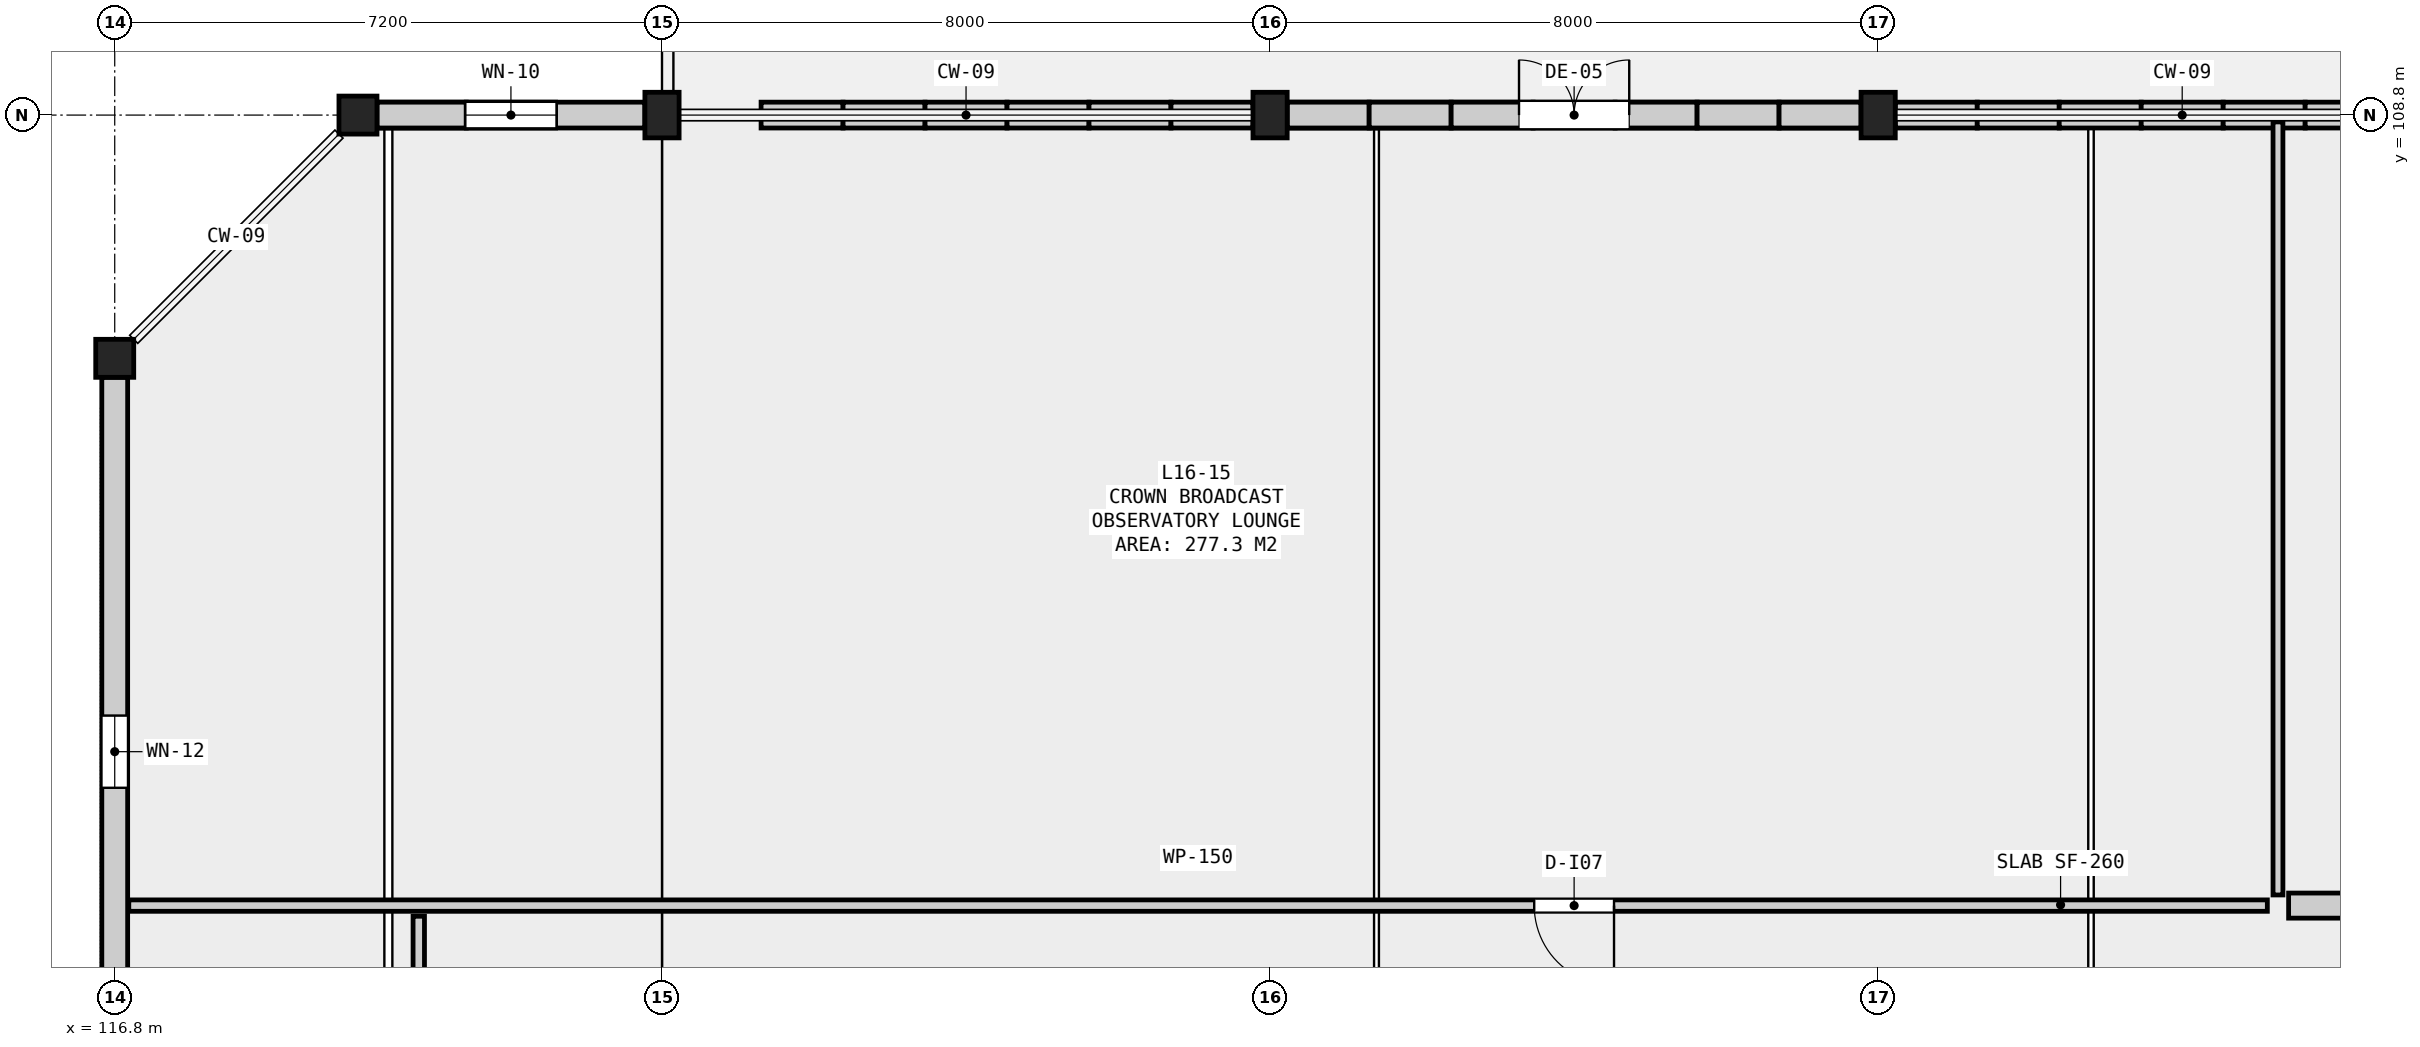
"""IFC4 building model, lengths in metres.
Left out: names, types, materials, properties, quantities, classifications, styles, units other than length and angle.
Written with IfcOpenShell. Run it as: python <this file> out.ifc"""

import sys

from ifc_helpers import new_model, si_unit, direction, frame, frame_2d, origin, origin_2d, place, context, subcontext, project, spatial, rectangle, circle, extrude, element, fill, save


model = new_model("IFC4")
c1 = context("Model", 3, precision=1e-05, world=origin(), true_north=direction((0.0, 1.0)))
c2 = subcontext(c1, "Body", "Model", "MODEL_VIEW")
j1 = project(units=[si_unit("LENGTHUNIT", "METRE"), si_unit("PLANEANGLEUNIT", "RADIAN")], contexts=[c1])
p1 = place(None, origin())
s1 = spatial("IfcSite", under=j1, at=p1, CompositionType="ELEMENT")
p2 = place(p1, origin())
s2 = spatial("IfcBuilding", under=s1, at=p2, CompositionType="ELEMENT")
p3 = place(p2, frame((0.0, 0.0, 66.6)))
s3 = spatial("IfcBuildingStorey", under=s2, at=p3, CompositionType="ELEMENT", Elevation=66.6)
for number, where, z_axis, x_axis in (
    (1, (116.8, 105.6, 0.0), (0.0, 0.0, 1.0), (1.0, 0.0, 0.0)),
    (2, (120.0, 108.8, 0.0), (0.0, 0.0, 1.0), (1.0, 0.0, 0.0)),
):
    element("IfcColumn", number, at=place(p3, frame(where, z_axis=z_axis, x_axis=x_axis)), inside=s3, PredefinedType="COLUMN", context=c2, shape_type="SweptSolid", body=[
        extrude(circle(Radius=0.25, at=origin_2d()), origin(), (0.0, 0.0, 1.0), 4.5),
    ])
for number, where, z_axis, x_axis in (
    (3, (124.0, 108.8, 0.0), (0.0, 0.0, 1.0), (1.0, 0.0, 0.0)),
    (4, (132.0, 108.8, 0.0), (0.0, 0.0, 1.0), (1.0, 0.0, 0.0)),
    (5, (140.0, 108.8, 0.0), (0.0, 0.0, 1.0), (1.0, 0.0, 0.0)),
):
    element("IfcColumn", number, at=place(p3, frame(where, z_axis=z_axis, x_axis=x_axis)), inside=s3, PredefinedType="COLUMN", context=c2, shape_type="SweptSolid", body=[
        extrude(rectangle(XDim=0.45, YDim=0.6, at=origin_2d()), origin(), (0.0, 0.0, 1.0), 4.5),
    ])
p4 = place(p3, frame((139.775, 108.8, 0.0), z_axis=(0.0, 0.0, 1.0), x_axis=(-1.0, 0.0, 0.0)))
e6 = element("IfcWall", 6, at=p4, inside=s3, PredefinedType="SOLIDWALL", context=c2, shape_type="SweptSolid", body=[
    extrude(rectangle(XDim=7.55, YDim=0.34, at=frame_2d((3.775, 0.0))), origin(), (0.0, 0.0, 1.0), 3.6),
])
p5 = place(p4, frame((3.05, 0.0, 0.0)))
e7 = element("IfcOpeningElement", 7, at=p5, cuts=e6, PredefinedType="OPENING", context=c2, shape_type="SweptSolid", body=[
    extrude(rectangle(XDim=1.45, YDim=2.2, at=frame_2d((0.725, 1.1))), frame((0.0, 0.182, 0.0), z_axis=(0.0, -1.0, 0.0), x_axis=(1.0, 0.0, 0.0)), (0.0, 0.0, 1.0), 0.364),
])
p6 = place(p3, frame((123.775, 108.8, 0.0), z_axis=(0.0, 0.0, 1.0), x_axis=(-1.0, 0.0, 0.0)))
e8 = element("IfcWall", 8, at=p6, inside=s3, PredefinedType="SOLIDWALL", context=c2, shape_type="SweptSolid", body=[
    extrude(rectangle(XDim=3.525, YDim=0.34, at=frame_2d((1.762, 0.0))), origin(), (0.0, 0.0, 1.0), 3.65),
])
p7 = place(p6, frame((1.163, 0.0, 0.9)))
e9 = element("IfcOpeningElement", 9, at=p7, cuts=e8, PredefinedType="OPENING", context=c2, shape_type="SweptSolid", body=[
    extrude(rectangle(XDim=1.2, YDim=1.7, at=frame_2d((0.6, 0.85))), frame((0.0, 0.182, 0.0), z_axis=(0.0, -1.0, 0.0), x_axis=(1.0, 0.0, 0.0)), (0.0, 0.0, 1.0), 0.364),
])
p8 = place(p3, frame((116.8, 105.35, 0.0), z_axis=(0.0, 0.0, 1.0), x_axis=(0.0, -1.0, 0.0)))
e10 = element("IfcWall", 10, at=p8, inside=s3, PredefinedType="SOLIDWALL", context=c2, shape_type="SweptSolid", body=[
    extrude(rectangle(XDim=9.85, YDim=0.34, at=frame_2d((4.925, 0.0))), origin(), (0.0, 0.0, 1.0), 3.65),
])
p9 = place(p8, frame((4.45, 0.0, 0.9)))
e11 = element("IfcOpeningElement", 11, at=p9, cuts=e10, PredefinedType="OPENING", context=c2, shape_type="SweptSolid", body=[
    extrude(rectangle(XDim=0.95, YDim=1.45, at=frame_2d((0.475, 0.725))), frame((0.0, 0.182, 0.0), z_axis=(0.0, -1.0, 0.0), x_axis=(1.0, 0.0, 0.0)), (0.0, 0.0, 1.0), 0.364),
])
p10 = place(p3, frame((125.304, 108.8, 4.5), z_axis=(0.0, 0.0, 1.0), x_axis=(1.0, 0.0, 0.0)))
e12 = element("IfcWall", 12, at=p10, inside=s3, PredefinedType="SOLIDWALL", context=c2, shape_type="SweptSolid", body=[
    extrude(rectangle(XDim=1.078, YDim=0.34, at=frame_2d((0.539, 0.0))), origin(), (0.0, 0.0, 1.0), 0.272),
])
p11 = place(p3, frame((126.382, 108.8, 4.5), z_axis=(0.0, 0.0, 1.0), x_axis=(1.0, 0.0, 0.0)))
e13 = element("IfcWall", 13, at=p11, inside=s3, PredefinedType="SOLIDWALL", context=c2, shape_type="SweptSolid", body=[
    extrude(rectangle(XDim=1.079, YDim=0.34, at=frame_2d((0.539, 0.0))), origin(), (0.0, 0.0, 1.0), 0.498),
])
p12 = place(p3, frame((127.461, 108.8, 4.5), z_axis=(0.0, 0.0, 1.0), x_axis=(1.0, 0.0, 0.0)))
e14 = element("IfcWall", 14, at=p12, inside=s3, PredefinedType="SOLIDWALL", context=c2, shape_type="SweptSolid", body=[
    extrude(rectangle(XDim=1.079, YDim=0.34, at=frame_2d((0.539, 0.0))), origin(), (0.0, 0.0, 1.0), 0.723),
])
p13 = place(p3, frame((128.539, 108.8, 4.5), z_axis=(0.0, 0.0, 1.0), x_axis=(1.0, 0.0, 0.0)))
e15 = element("IfcWall", 15, at=p13, inside=s3, PredefinedType="SOLIDWALL", context=c2, shape_type="SweptSolid", body=[
    extrude(rectangle(XDim=1.079, YDim=0.34, at=frame_2d((0.539, 0.0))), origin(), (0.0, 0.0, 1.0), 0.948),
])
p14 = place(p3, frame((129.618, 108.8, 4.5), z_axis=(0.0, 0.0, 1.0), x_axis=(1.0, 0.0, 0.0)))
e16 = element("IfcWall", 16, at=p14, inside=s3, PredefinedType="SOLIDWALL", context=c2, shape_type="SweptSolid", body=[
    extrude(rectangle(XDim=1.078, YDim=0.34, at=frame_2d((0.539, 0.0))), origin(), (0.0, 0.0, 1.0), 1.174),
])
p15 = place(p3, frame((130.696, 108.8, 4.5), z_axis=(0.0, 0.0, 1.0), x_axis=(1.0, 0.0, 0.0)))
e17 = element("IfcWall", 17, at=p15, inside=s3, PredefinedType="SOLIDWALL", context=c2, shape_type="SweptSolid", body=[
    extrude(rectangle(XDim=1.079, YDim=0.34, at=frame_2d((0.539, 0.0))), origin(), (0.0, 0.0, 1.0), 1.399),
])
p16 = place(p3, frame((132.225, 108.8, 4.5), z_axis=(0.0, 0.0, 1.0), x_axis=(1.0, 0.0, 0.0)))
e18 = element("IfcWall", 18, at=p16, inside=s3, PredefinedType="SOLIDWALL", context=c2, shape_type="SweptSolid", body=[
    extrude(rectangle(XDim=1.079, YDim=0.34, at=frame_2d((0.539, 0.0))), origin(), (0.0, 0.0, 1.0), 1.718),
])
p17 = place(p3, frame((133.304, 108.8, 4.5), z_axis=(0.0, 0.0, 1.0), x_axis=(1.0, 0.0, 0.0)))
e19 = element("IfcWall", 19, at=p17, inside=s3, PredefinedType="SOLIDWALL", context=c2, shape_type="SweptSolid", body=[
    extrude(rectangle(XDim=1.078, YDim=0.34, at=frame_2d((0.539, 0.0))), origin(), (0.0, 0.0, 1.0), 1.944),
])
p18 = place(p3, frame((134.382, 108.8, 4.5), z_axis=(0.0, 0.0, 1.0), x_axis=(1.0, 0.0, 0.0)))
e20 = element("IfcWall", 20, at=p18, inside=s3, PredefinedType="SOLIDWALL", context=c2, shape_type="SweptSolid", body=[
    extrude(rectangle(XDim=1.079, YDim=0.34, at=frame_2d((0.539, 0.0))), origin(), (0.0, 0.0, 1.0), 2.14),
])
p19 = place(p3, frame((135.461, 108.8, 4.5), z_axis=(0.0, 0.0, 1.0), x_axis=(1.0, 0.0, 0.0)))
e21 = element("IfcWall", 21, at=p19, inside=s3, PredefinedType="SOLIDWALL", context=c2, shape_type="SweptSolid", body=[
    extrude(rectangle(XDim=1.079, YDim=0.34, at=frame_2d((0.539, 0.0))), origin(), (0.0, 0.0, 1.0), 2.334),
])
p20 = place(p3, frame((136.539, 108.8, 4.5), z_axis=(0.0, 0.0, 1.0), x_axis=(1.0, 0.0, 0.0)))
e22 = element("IfcWall", 22, at=p20, inside=s3, PredefinedType="SOLIDWALL", context=c2, shape_type="SweptSolid", body=[
    extrude(rectangle(XDim=1.079, YDim=0.34, at=frame_2d((0.539, 0.0))), origin(), (0.0, 0.0, 1.0), 2.529),
])
p21 = place(p3, frame((137.618, 108.8, 4.5), z_axis=(0.0, 0.0, 1.0), x_axis=(1.0, 0.0, 0.0)))
e23 = element("IfcWall", 23, at=p21, inside=s3, PredefinedType="SOLIDWALL", context=c2, shape_type="SweptSolid", body=[
    extrude(rectangle(XDim=1.078, YDim=0.34, at=frame_2d((0.539, 0.0))), origin(), (0.0, 0.0, 1.0), 2.723),
])
p22 = place(p3, frame((138.696, 108.8, 4.5), z_axis=(0.0, 0.0, 1.0), x_axis=(1.0, 0.0, 0.0)))
e24 = element("IfcWall", 24, at=p22, inside=s3, PredefinedType="SOLIDWALL", context=c2, shape_type="SweptSolid", body=[
    extrude(rectangle(XDim=1.079, YDim=0.34, at=frame_2d((0.539, 0.0))), origin(), (0.0, 0.0, 1.0), 2.917),
])
p23 = place(p3, frame((140.225, 108.8, 4.5), z_axis=(0.0, 0.0, 1.0), x_axis=(1.0, 0.0, 0.0)))
e25 = element("IfcWall", 25, at=p23, inside=s3, PredefinedType="SOLIDWALL", context=c2, shape_type="SweptSolid", body=[
    extrude(rectangle(XDim=1.079, YDim=0.34, at=frame_2d((0.539, 0.0))), origin(), (0.0, 0.0, 1.0), 3.192),
])
p24 = place(p3, frame((141.304, 108.8, 4.5), z_axis=(0.0, 0.0, 1.0), x_axis=(1.0, 0.0, 0.0)))
e26 = element("IfcWall", 26, at=p24, inside=s3, PredefinedType="SOLIDWALL", context=c2, shape_type="SweptSolid", body=[
    extrude(rectangle(XDim=1.078, YDim=0.34, at=frame_2d((0.539, 0.0))), origin(), (0.0, 0.0, 1.0), 3.386),
])
p25 = place(p3, frame((142.382, 108.8, 4.5), z_axis=(0.0, 0.0, 1.0), x_axis=(1.0, 0.0, 0.0)))
e27 = element("IfcWall", 27, at=p25, inside=s3, PredefinedType="SOLIDWALL", context=c2, shape_type="SweptSolid", body=[
    extrude(rectangle(XDim=1.079, YDim=0.34, at=frame_2d((0.539, 0.0))), origin(), (0.0, 0.0, 1.0), 3.536),
])
p26 = place(p3, frame((143.461, 108.8, 4.5), z_axis=(0.0, 0.0, 1.0), x_axis=(1.0, 0.0, 0.0)))
e28 = element("IfcWall", 28, at=p26, inside=s3, PredefinedType="SOLIDWALL", context=c2, shape_type="SweptSolid", body=[
    extrude(rectangle(XDim=1.079, YDim=0.34, at=frame_2d((0.539, 0.0))), origin(), (0.0, 0.0, 1.0), 3.342),
])
p27 = place(p3, frame((144.539, 108.8, 4.5), z_axis=(0.0, 0.0, 1.0), x_axis=(1.0, 0.0, 0.0)))
e29 = element("IfcWall", 29, at=p27, inside=s3, PredefinedType="SOLIDWALL", context=c2, shape_type="SweptSolid", body=[
    extrude(rectangle(XDim=1.079, YDim=0.34, at=frame_2d((0.539, 0.0))), origin(), (0.0, 0.0, 1.0), 3.148),
])
p28 = place(p3, frame((145.618, 108.8, 4.5), z_axis=(0.0, 0.0, 1.0), x_axis=(1.0, 0.0, 0.0)))
e30 = element("IfcWall", 30, at=p28, inside=s3, PredefinedType="SOLIDWALL", context=c2, shape_type="SweptSolid", body=[
    extrude(rectangle(XDim=1.078, YDim=0.34, at=frame_2d((0.539, 0.0))), origin(), (0.0, 0.0, 1.0), 2.954),
])
p29 = place(p3, frame((120.25, 108.8, 4.5), z_axis=(0.0, 0.0, 1.0), x_axis=(1.0, 0.0, 0.0)))
e31 = element("IfcWall", 31, at=p29, inside=s3, PredefinedType="SOLIDWALL", context=c2, shape_type="SweptSolid", body=[
    extrude(rectangle(XDim=1.175, YDim=0.34, at=frame_2d((0.587, 0.0))), origin(), (0.0, 0.0, 1.0), 0.937),
])
p30 = place(p3, frame((121.425, 108.8, 4.5), z_axis=(0.0, 0.0, 1.0), x_axis=(1.0, 0.0, 0.0)))
e32 = element("IfcWall", 32, at=p30, inside=s3, PredefinedType="SOLIDWALL", context=c2, shape_type="SweptSolid", body=[
    extrude(rectangle(XDim=1.175, YDim=0.34, at=frame_2d((0.587, 0.0))), origin(), (0.0, 0.0, 1.0), 0.51),
])
p31 = place(p3, frame((116.985, 98.4, 0.0), z_axis=(0.0, 0.0, 1.0), x_axis=(1.0, 0.0, 0.0)))
e33 = element("IfcWall", 33, at=p31, inside=s3, PredefinedType="PARTITIONING", context=c2, shape_type="SweptSolid", body=[
    extrude(rectangle(XDim=28.135, YDim=0.15, at=frame_2d((14.067, 0.0))), origin(), (0.0, 0.0, 1.0), 3.55),
])
p32 = place(p31, frame((18.49, 0.0, 0.0)))
e34 = element("IfcOpeningElement", 34, at=p32, cuts=e33, PredefinedType="OPENING", context=c2, shape_type="SweptSolid", body=[
    extrude(rectangle(XDim=1.05, YDim=2.15, at=frame_2d((0.525, 1.075))), frame((0.0, 0.087, 0.0), z_axis=(0.0, -1.0, 0.0), x_axis=(1.0, 0.0, 0.0)), (0.0, 0.0, 1.0), 0.174),
])
p33 = place(p3, frame((145.26, 98.54, 0.0), z_axis=(0.0, 0.0, 1.0), x_axis=(0.0, 1.0, 0.0)))
e35 = element("IfcWall", 35, at=p33, inside=s3, PredefinedType="PARTITIONING", context=c2, shape_type="SweptSolid", body=[
    extrude(rectangle(XDim=10.17, YDim=0.13, at=frame_2d((5.085, 0.0))), origin(), (0.0, 0.0, 1.0), 3.55),
])
p34 = place(p3, frame((145.4, 98.4, 0.0), z_axis=(0.0, 0.0, 1.0), x_axis=(1.0, 0.0, 0.0)))
e36 = element("IfcWall", 36, at=p34, inside=s3, PredefinedType="SOLIDWALL", context=c2, shape_type="SweptSolid", body=[
    extrude(rectangle(XDim=22.51, YDim=0.33, at=frame_2d((11.255, 0.0))), origin(), (0.0, 0.0, 1.0), 3.55),
])
p35 = place(p34, frame((2.7, 0.0, 0.0)))
e37 = element("IfcOpeningElement", 37, at=p35, cuts=e36, PredefinedType="OPENING", context=c2, shape_type="SweptSolid", body=[
    extrude(rectangle(XDim=1.4, YDim=2.2, at=frame_2d((0.7, 1.1))), frame((0.0, 0.177, 0.0), z_axis=(0.0, -1.0, 0.0), x_axis=(1.0, 0.0, 0.0)), (0.0, 0.0, 1.0), 0.354),
])
p36 = place(p3, frame((120.8, 76.14, 0.0), z_axis=(0.0, 0.0, 1.0), x_axis=(0.0, 1.0, 0.0)))
e38 = element("IfcWall", 38, at=p36, inside=s3, PredefinedType="PARTITIONING", context=c2, shape_type="SweptSolid", body=[
    extrude(rectangle(XDim=22.12, YDim=0.15, at=frame_2d((11.06, 0.0))), origin(), (0.0, 0.0, 1.0), 3.55),
])
p37 = place(p36, frame((10.535, 0.0, 0.0)))
e39 = element("IfcOpeningElement", 39, at=p37, cuts=e38, PredefinedType="OPENING", context=c2, shape_type="SweptSolid", body=[
    extrude(rectangle(XDim=1.05, YDim=2.15, at=frame_2d((0.525, 1.075))), frame((0.0, 0.087, 0.0), z_axis=(0.0, -1.0, 0.0), x_axis=(1.0, 0.0, 0.0)), (0.0, 0.0, 1.0), 0.174),
])
p38 = place(p5, frame((1.45, 0.0, 0.0), z_axis=(0.0, 0.0, 1.0), x_axis=(-1.0, 0.0, 0.0)))
e40 = element("IfcDoor", 40, at=p38, inside=s3, OperationType="DOUBLE_DOOR_SINGLE_SWING", PredefinedType="DOOR", context=c2, shape_type="SweptSolid", body=[
    extrude(rectangle(XDim=1.45, YDim=2.2, at=frame_2d((0.725, 1.1))), frame((0.0, 0.025, 0.0), z_axis=(0.0, -1.0, 0.0), x_axis=(1.0, 0.0, 0.0)), (0.0, 0.0, 1.0), 0.05),
])
fill(e7, e40)
p39 = place(p7, origin())
e41 = element("IfcWindow", 41, at=p39, inside=s3, PartitioningType="SINGLE_PANEL", PredefinedType="WINDOW", context=c2, shape_type="SweptSolid", body=[
    extrude(rectangle(XDim=1.2, YDim=1.7, at=frame_2d((0.6, 0.85))), frame((0.0, 0.03, 0.0), z_axis=(0.0, -1.0, 0.0), x_axis=(1.0, 0.0, 0.0)), (0.0, 0.0, 1.0), 0.06),
])
fill(e9, e41)
p40 = place(p9, origin())
e42 = element("IfcWindow", 42, at=p40, inside=s3, PartitioningType="SINGLE_PANEL", PredefinedType="WINDOW", context=c2, shape_type="SweptSolid", body=[
    extrude(rectangle(XDim=0.95, YDim=1.45, at=frame_2d((0.475, 0.725))), frame((0.0, 0.03, 0.0), z_axis=(0.0, -1.0, 0.0), x_axis=(1.0, 0.0, 0.0)), (0.0, 0.0, 1.0), 0.06),
])
fill(e11, e42)
p41 = place(p32, frame((1.05, 0.0, 0.0), z_axis=(0.0, 0.0, 1.0), x_axis=(-1.0, 0.0, 0.0)))
e43 = element("IfcDoor", 43, at=p41, inside=s3, OperationType="SINGLE_SWING_LEFT", PredefinedType="DOOR", context=c2, shape_type="SweptSolid", body=[
    extrude(rectangle(XDim=1.05, YDim=2.15, at=frame_2d((0.525, 1.075))), frame((0.0, 0.025, 0.0), z_axis=(0.0, -1.0, 0.0), x_axis=(1.0, 0.0, 0.0)), (0.0, 0.0, 1.0), 0.05),
])
fill(e34, e43)
save(model, sys.argv[1])
